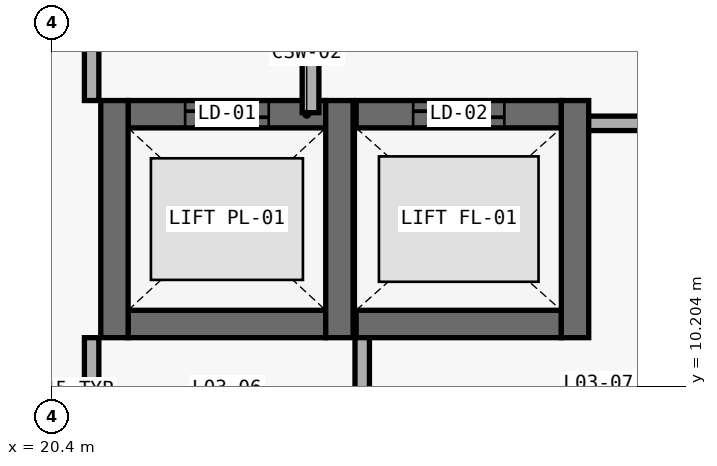
"""IFC4 building model, lengths in metres.
Left out: names, types, materials, properties, quantities, classifications, styles, units other than length and angle.
Written with IfcOpenShell. Run it as: python <this file> out.ifc"""

import sys

from ifc_helpers import new_model, si_unit, direction, frame, frame_2d, origin, place, context, subcontext, project, spatial, rectangle, extrude, element, fill, save


model = new_model("IFC4")
c1 = context("Model", 3, precision=1e-05, world=origin(), true_north=direction((0.0, 1.0)))
c2 = subcontext(c1, "Body", "Model", "MODEL_VIEW")
j1 = project(units=[si_unit("LENGTHUNIT", "METRE"), si_unit("PLANEANGLEUNIT", "RADIAN")], contexts=[c1])
p1 = place(None, origin())
s1 = spatial("IfcSite", under=j1, at=p1, CompositionType="ELEMENT")
p2 = place(p1, origin())
s2 = spatial("IfcBuilding", under=s1, at=p2, CompositionType="ELEMENT")
p3 = place(p2, frame((0.0, 0.0, 17.1)))
s3 = spatial("IfcBuildingStorey", under=s2, at=p3, CompositionType="ELEMENT", Elevation=17.1)
p4 = place(p3, frame((21.4, 13.78, 0.0), z_axis=(0.0, 0.0, 1.0), x_axis=(1.0, 0.0, 0.0)))
e1 = element("IfcWall", 1, at=p4, inside=s3, PredefinedType="SHEAR", context=c2, shape_type="SweptSolid", body=[
    extrude(rectangle(XDim=2.6, YDim=0.36, at=frame_2d((1.3, 0.0))), origin(), (0.0, 0.0, 1.0), 3.94),
])
p5 = place(p4, frame((0.75, 0.0, 0.0)))
e2 = element("IfcOpeningElement", 2, at=p5, cuts=e1, PredefinedType="OPENING", context=c2, shape_type="SweptSolid", body=[
    extrude(rectangle(XDim=1.1, YDim=2.15, at=frame_2d((0.55, 1.075))), frame((0.0, 0.195, 0.0), z_axis=(0.0, -1.0, 0.0), x_axis=(1.0, 0.0, 0.0)), (0.0, 0.0, 1.0), 0.39),
])
p6 = place(p3, frame((21.4, 11.02, 0.0), z_axis=(0.0, 0.0, 1.0), x_axis=(1.0, 0.0, 0.0)))
e3 = element("IfcWall", 3, at=p6, inside=s3, PredefinedType="SHEAR", context=c2, shape_type="SweptSolid", body=[
    extrude(rectangle(XDim=2.6, YDim=0.36, at=frame_2d((1.3, 0.0))), origin(), (0.0, 0.0, 1.0), 3.94),
])
for number, where, z_axis, x_axis in (
    (4, (21.22, 10.84, 0.0), (0.0, 0.0, 1.0), (0.0, 1.0, 0.0)),
    (5, (24.18, 10.84, 0.0), (0.0, 0.0, 1.0), (0.0, 1.0, 0.0)),
):
    element("IfcWall", number, at=place(p3, frame(where, z_axis=z_axis, x_axis=x_axis)), inside=s3, PredefinedType="SHEAR", context=c2, shape_type="SweptSolid", body=[
        extrude(rectangle(XDim=3.12, YDim=0.36, at=frame_2d((1.56, 0.0))), origin(), (0.0, 0.0, 1.0), 3.94),
    ])
p7 = place(p3, frame((24.4, 13.78, 0.0), z_axis=(0.0, 0.0, 1.0), x_axis=(1.0, 0.0, 0.0)))
e6 = element("IfcWall", 6, at=p7, inside=s3, PredefinedType="SHEAR", context=c2, shape_type="SweptSolid", body=[
    extrude(rectangle(XDim=2.7, YDim=0.36, at=frame_2d((1.35, 0.0))), origin(), (0.0, 0.0, 1.0), 3.94),
])
p8 = place(p7, frame((0.75, 0.0, 0.0)))
e7 = element("IfcOpeningElement", 7, at=p8, cuts=e6, PredefinedType="OPENING", context=c2, shape_type="SweptSolid", body=[
    extrude(rectangle(XDim=1.2, YDim=2.15, at=frame_2d((0.6, 1.075))), frame((0.0, 0.195, 0.0), z_axis=(0.0, -1.0, 0.0), x_axis=(1.0, 0.0, 0.0)), (0.0, 0.0, 1.0), 0.39),
])
p9 = place(p3, frame((24.4, 11.02, 0.0), z_axis=(0.0, 0.0, 1.0), x_axis=(1.0, 0.0, 0.0)))
e8 = element("IfcWall", 8, at=p9, inside=s3, PredefinedType="SHEAR", context=c2, shape_type="SweptSolid", body=[
    extrude(rectangle(XDim=2.7, YDim=0.36, at=frame_2d((1.35, 0.0))), origin(), (0.0, 0.0, 1.0), 3.94),
])
p10 = place(p3, frame((27.28, 10.84, 0.0), z_axis=(0.0, 0.0, 1.0), x_axis=(0.0, 1.0, 0.0)))
e9 = element("IfcWall", 9, at=p10, inside=s3, PredefinedType="SHEAR", context=c2, shape_type="SweptSolid", body=[
    extrude(rectangle(XDim=3.12, YDim=0.36, at=frame_2d((1.56, 0.0))), origin(), (0.0, 0.0, 1.0), 3.94),
])
p11 = place(p3, frame((23.8, 13.8, 0.0), z_axis=(0.0, 0.0, 1.0), x_axis=(0.0, 1.0, 0.0)))
e10 = element("IfcWall", 10, at=p11, inside=s3, PredefinedType="PARTITIONING", context=c2, shape_type="SweptSolid", body=[
    extrude(rectangle(XDim=3.49, YDim=0.22, at=frame_2d((1.745, 0.0))), origin(), (0.0, 0.0, 1.0), 2.82),
])
p12 = place(p3, frame((27.46, 13.66, 0.0), z_axis=(0.0, 0.0, 1.0), x_axis=(1.0, 0.0, 0.0)))
e11 = element("IfcWall", 11, at=p12, inside=s3, PredefinedType="PARTITIONING", context=c2, shape_type="SweptSolid", body=[
    extrude(rectangle(XDim=1.14, YDim=0.19, at=frame_2d((0.57, 0.0))), origin(), (0.0, 0.0, 1.0), 2.82),
])
p13 = place(p3, frame((20.92, 9.015, 0.0), z_axis=(0.0, 0.0, 1.0), x_axis=(0.0, 1.0, 0.0)))
e12 = element("IfcWall", 12, at=p13, inside=s3, PredefinedType="PARTITIONING", context=c2, shape_type="SweptSolid", body=[
    extrude(rectangle(XDim=1.825, YDim=0.19, at=frame_2d((0.913, 0.0))), origin(), (0.0, 0.0, 1.0), 2.82),
])
p14 = place(p3, frame((20.92, 13.96, 0.0), z_axis=(0.0, 0.0, 1.0), x_axis=(0.0, 1.0, 0.0)))
e13 = element("IfcWall", 13, at=p14, inside=s3, PredefinedType="PARTITIONING", context=c2, shape_type="SweptSolid", body=[
    extrude(rectangle(XDim=2.425, YDim=0.19, at=frame_2d((1.212, 0.0))), origin(), (0.0, 0.0, 1.0), 2.82),
])
p15 = place(p3, frame((24.48, 9.015, 0.0), z_axis=(0.0, 0.0, 1.0), x_axis=(0.0, 1.0, 0.0)))
e14 = element("IfcWall", 14, at=p15, inside=s3, PredefinedType="PARTITIONING", context=c2, shape_type="SweptSolid", body=[
    extrude(rectangle(XDim=1.825, YDim=0.19, at=frame_2d((0.913, 0.0))), origin(), (0.0, 0.0, 1.0), 2.82),
])
p16 = place(p5, origin())
e15 = element("IfcDoor", 15, at=p16, inside=s3, OperationType="DOUBLE_DOOR_SLIDING", PredefinedType="DOOR", context=c2, shape_type="SweptSolid", body=[
    extrude(rectangle(XDim=1.1, YDim=2.15, at=frame_2d((0.55, 1.075))), frame((0.0, 0.025, 0.0), z_axis=(0.0, -1.0, 0.0), x_axis=(1.0, 0.0, 0.0)), (0.0, 0.0, 1.0), 0.05),
])
fill(e2, e15)
p17 = place(p8, origin())
e16 = element("IfcDoor", 16, at=p17, inside=s3, OperationType="DOUBLE_DOOR_SLIDING", PredefinedType="DOOR", context=c2, shape_type="SweptSolid", body=[
    extrude(rectangle(XDim=1.2, YDim=2.15, at=frame_2d((0.6, 1.075))), frame((0.0, 0.025, 0.0), z_axis=(0.0, -1.0, 0.0), x_axis=(1.0, 0.0, 0.0)), (0.0, 0.0, 1.0), 0.05),
])
fill(e7, e16)
save(model, sys.argv[1])
